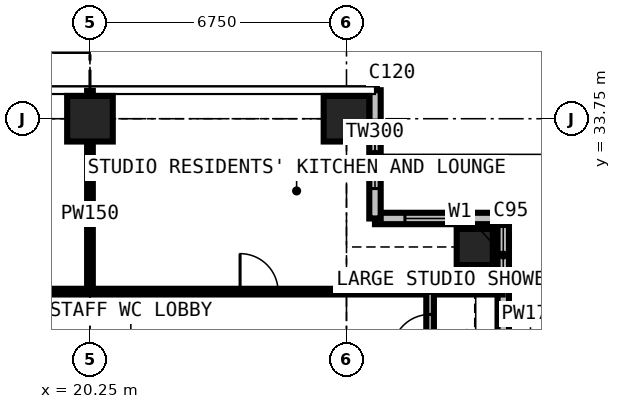
"""IFC4 building model, lengths in metres.
Left out: names, types, materials, properties, quantities, classifications, styles, units other than length and angle.
Written with IfcOpenShell. Run it as: python <this file> out.ifc"""

import sys

from ifc_helpers import new_model, si_unit, direction, frame, frame_2d, origin, origin_2d, place, context, subcontext, project, spatial, rectangle, extrude, element, fill, save


model = new_model("IFC4")
c1 = context("Model", 3, precision=1e-05, world=origin(), true_north=direction((0.0, 1.0)))
c2 = subcontext(c1, "Body", "Model", "MODEL_VIEW")
j1 = project(units=[si_unit("LENGTHUNIT", "METRE"), si_unit("PLANEANGLEUNIT", "RADIAN")], contexts=[c1])
p1 = place(None, origin())
s1 = spatial("IfcSite", under=j1, at=p1, CompositionType="ELEMENT")
p2 = place(p1, origin())
s2 = spatial("IfcBuilding", under=s1, at=p2, CompositionType="ELEMENT")
p3 = place(p2, frame((0.0, 0.0, 174.6)))
s3 = spatial("IfcBuildingStorey", under=s2, at=p3, CompositionType="ELEMENT", Elevation=174.6)
for number, where, z_axis, x_axis in (
    (1, (20.25, 33.75, 0.0), (0.0, 0.0, 1.0), (1.0, 0.0, 0.0)),
    (2, (27.0, 33.75, 0.0), (0.0, 0.0, 1.0), (1.0, 0.0, 0.0)),
):
    element("IfcColumn", number, at=place(p3, frame(where, z_axis=z_axis, x_axis=x_axis)), inside=s3, PredefinedType="COLUMN", context=c2, shape_type="SweptSolid", body=[
        extrude(rectangle(XDim=1.2, YDim=1.2, at=origin_2d()), origin(), (0.0, 0.0, 1.0), 3.6),
    ])
p4 = place(p3, frame((30.375, 30.375, 0.0), z_axis=(0.0, 0.0, 1.0), x_axis=(1.0, 0.0, 0.0)))
e3 = element("IfcColumn", 3, at=p4, inside=s3, PredefinedType="COLUMN", context=c2, shape_type="SweptSolid", body=[
    extrude(rectangle(XDim=0.95, YDim=0.95, at=origin_2d()), origin(), (0.0, 0.0, 1.0), 3.6),
])
p5 = place(p3, frame((31.125, 27.75, 0.0), z_axis=(0.0, 0.0, 1.0), x_axis=(0.0, 1.0, 0.0)))
e4 = element("IfcWall", 4, at=p5, inside=s3, PredefinedType="SOLIDWALL", context=c2, shape_type="SweptSolid", body=[
    extrude(rectangle(XDim=3.375, YDim=0.3, at=frame_2d((1.688, 0.0))), origin(), (0.0, 0.0, 1.0), 3.375),
])
p6 = place(p5, frame((1.663, 0.0, 0.9)))
e5 = element("IfcOpeningElement", 5, at=p6, cuts=e4, PredefinedType="OPENING", context=c2, shape_type="SweptSolid", body=[
    extrude(rectangle(XDim=1.5, YDim=1.8, at=frame_2d((0.75, 0.9))), frame((0.0, 0.16, 0.0), z_axis=(0.0, -1.0, 0.0), x_axis=(1.0, 0.0, 0.0)), (0.0, 0.0, 1.0), 0.32),
])
p7 = place(p3, frame((31.125, 31.125, 0.0), z_axis=(0.0, 0.0, 1.0), x_axis=(-1.0, 0.0, 0.0)))
e6 = element("IfcWall", 6, at=p7, inside=s3, PredefinedType="SOLIDWALL", context=c2, shape_type="SweptSolid", body=[
    extrude(rectangle(XDim=3.375, YDim=0.3, at=frame_2d((1.688, 0.0))), origin(), (0.0, 0.0, 1.0), 3.375),
])
p8 = place(p7, frame((0.788, 0.0, 0.6)))
e7 = element("IfcOpeningElement", 7, at=p8, cuts=e6, PredefinedType="OPENING", context=c2, shape_type="SweptSolid", body=[
    extrude(rectangle(XDim=1.8, YDim=2.1, at=frame_2d((0.9, 1.05))), frame((0.0, 0.16, 0.0), z_axis=(0.0, -1.0, 0.0), x_axis=(1.0, 0.0, 0.0)), (0.0, 0.0, 1.0), 0.32),
])
p9 = place(p3, frame((27.75, 31.125, 0.0), z_axis=(0.0, 0.0, 1.0), x_axis=(0.0, 1.0, 0.0)))
e8 = element("IfcWall", 8, at=p9, inside=s3, PredefinedType="SOLIDWALL", context=c2, shape_type="SweptSolid", body=[
    extrude(rectangle(XDim=3.375, YDim=0.3, at=frame_2d((1.688, 0.0))), origin(), (0.0, 0.0, 1.0), 3.375),
])
p10 = place(p9, frame((0.788, 0.0, 0.6)))
e9 = element("IfcOpeningElement", 9, at=p10, cuts=e8, PredefinedType="OPENING", context=c2, shape_type="SweptSolid", body=[
    extrude(rectangle(XDim=1.8, YDim=2.1, at=frame_2d((0.9, 1.05))), frame((0.0, 0.16, 0.0), z_axis=(0.0, -1.0, 0.0), x_axis=(1.0, 0.0, 0.0)), (0.0, 0.0, 1.0), 0.32),
])
p11 = place(p3, frame((11.3, 29.2, 0.0), z_axis=(0.0, 0.0, 1.0), x_axis=(1.0, 0.0, 0.0)))
e10 = element("IfcWall", 10, at=p11, inside=s3, PredefinedType="PARTITIONING", context=c2, shape_type="SweptSolid", body=[
    extrude(rectangle(XDim=19.809, YDim=0.15, at=frame_2d((9.904, 0.0))), origin(), (0.0, 0.0, 1.0), 3.375),
])
p12 = place(p11, frame((12.9, 0.0, 0.0)))
e11 = element("IfcOpeningElement", 11, at=p12, cuts=e10, PredefinedType="OPENING", context=c2, shape_type="SweptSolid", body=[
    extrude(rectangle(XDim=1.0, YDim=2.2, at=frame_2d((0.5, 1.1))), frame((0.0, 0.085, 0.0), z_axis=(0.0, -1.0, 0.0), x_axis=(1.0, 0.0, 0.0)), (0.0, 0.0, 1.0), 0.17),
])
p13 = place(p11, frame((6.4, 0.0, 0.0)))
e12 = element("IfcOpeningElement", 12, at=p13, cuts=e10, PredefinedType="OPENING", context=c2, shape_type="SweptSolid", body=[
    extrude(rectangle(XDim=0.95, YDim=2.2, at=frame_2d((0.475, 1.1))), frame((0.0, 0.085, 0.0), z_axis=(0.0, -1.0, 0.0), x_axis=(1.0, 0.0, 0.0)), (0.0, 0.0, 1.0), 0.17),
])
p14 = place(p11, frame((0.6, 0.0, 0.0)))
e13 = element("IfcOpeningElement", 13, at=p14, cuts=e10, PredefinedType="OPENING", context=c2, shape_type="SweptSolid", body=[
    extrude(rectangle(XDim=1.0, YDim=2.2, at=frame_2d((0.5, 1.1))), frame((0.0, 0.085, 0.0), z_axis=(0.0, -1.0, 0.0), x_axis=(1.0, 0.0, 0.0)), (0.0, 0.0, 1.0), 0.17),
])
p15 = place(p3, frame((20.25, 29.2, 0.0), z_axis=(0.0, 0.0, 1.0), x_axis=(0.0, 1.0, 0.0)))
e14 = element("IfcWall", 14, at=p15, inside=s3, PredefinedType="PARTITIONING", context=c2, shape_type="SweptSolid", body=[
    extrude(rectangle(XDim=5.284, YDim=0.15, at=frame_2d((2.642, 0.0))), origin(), (0.0, 0.0, 1.0), 2.61),
])
p16 = place(p3, frame((29.2, 13.5, 0.0), z_axis=(0.0, 0.0, 1.0), x_axis=(0.0, 1.0, 0.0)))
e15 = element("IfcWall", 15, at=p16, inside=s3, PredefinedType="PARTITIONING", context=c2, shape_type="SweptSolid", body=[
    extrude(rectangle(XDim=15.7, YDim=0.2, at=frame_2d((7.85, 0.0))), origin(), (0.0, 0.0, 1.0), 3.375),
])
p17 = place(p16, frame((8.35, 0.0, 0.0)))
e16 = element("IfcOpeningElement", 16, at=p17, cuts=e15, PredefinedType="OPENING", context=c2, shape_type="SweptSolid", body=[
    extrude(rectangle(XDim=0.95, YDim=2.2, at=frame_2d((0.475, 1.1))), frame((0.0, 0.11, 0.0), z_axis=(0.0, -1.0, 0.0), x_axis=(1.0, 0.0, 0.0)), (0.0, 0.0, 1.0), 0.22),
])
p18 = place(p16, frame((1.6, 0.0, 0.0)))
e17 = element("IfcOpeningElement", 17, at=p18, cuts=e15, PredefinedType="OPENING", context=c2, shape_type="SweptSolid", body=[
    extrude(rectangle(XDim=0.95, YDim=2.2, at=frame_2d((0.475, 1.1))), frame((0.0, 0.11, 0.0), z_axis=(0.0, -1.0, 0.0), x_axis=(1.0, 0.0, 0.0)), (0.0, 0.0, 1.0), 0.22),
])
p19 = place(p16, frame((14.1, 0.0, 0.0)))
e18 = element("IfcOpeningElement", 18, at=p19, cuts=e15, PredefinedType="OPENING", context=c2, shape_type="SweptSolid", body=[
    extrude(rectangle(XDim=1.0, YDim=2.2, at=frame_2d((0.5, 1.1))), frame((0.0, 0.11, 0.0), z_axis=(0.0, -1.0, 0.0), x_axis=(1.0, 0.0, 0.0)), (0.0, 0.0, 1.0), 0.22),
])
p20 = place(p6, origin())
e19 = element("IfcWindow", 19, at=p20, inside=s3, PartitioningType="SINGLE_PANEL", PredefinedType="WINDOW", context=c2, shape_type="SweptSolid", body=[
    extrude(rectangle(XDim=1.5, YDim=1.8, at=frame_2d((0.75, 0.9))), frame((0.0, 0.03, 0.0), z_axis=(0.0, -1.0, 0.0), x_axis=(1.0, 0.0, 0.0)), (0.0, 0.0, 1.0), 0.06),
])
fill(e5, e19)
p21 = place(p8, origin())
e20 = element("IfcWindow", 20, at=p21, inside=s3, PartitioningType="SINGLE_PANEL", PredefinedType="WINDOW", context=c2, shape_type="SweptSolid", body=[
    extrude(rectangle(XDim=1.8, YDim=2.1, at=frame_2d((0.9, 1.05))), frame((0.0, 0.03, 0.0), z_axis=(0.0, -1.0, 0.0), x_axis=(1.0, 0.0, 0.0)), (0.0, 0.0, 1.0), 0.06),
])
fill(e7, e20)
p22 = place(p10, origin())
e21 = element("IfcWindow", 21, at=p22, inside=s3, PartitioningType="SINGLE_PANEL", PredefinedType="WINDOW", context=c2, shape_type="SweptSolid", body=[
    extrude(rectangle(XDim=1.8, YDim=2.1, at=frame_2d((0.9, 1.05))), frame((0.0, 0.03, 0.0), z_axis=(0.0, -1.0, 0.0), x_axis=(1.0, 0.0, 0.0)), (0.0, 0.0, 1.0), 0.06),
])
fill(e9, e21)
p23 = place(p19, origin())
e22 = element("IfcDoor", 22, at=p23, inside=s3, OperationType="SINGLE_SWING_LEFT", PredefinedType="DOOR", context=c2, shape_type="SweptSolid", body=[
    extrude(rectangle(XDim=1.0, YDim=2.2, at=frame_2d((0.5, 1.1))), frame((0.0, 0.025, 0.0), z_axis=(0.0, -1.0, 0.0), x_axis=(1.0, 0.0, 0.0)), (0.0, 0.0, 1.0), 0.05),
])
fill(e18, e22)
p24 = place(p12, origin())
e23 = element("IfcDoor", 23, at=p24, inside=s3, OperationType="SINGLE_SWING_LEFT", PredefinedType="DOOR", context=c2, shape_type="SweptSolid", body=[
    extrude(rectangle(XDim=1.0, YDim=2.2, at=frame_2d((0.5, 1.1))), frame((0.0, 0.025, 0.0), z_axis=(0.0, -1.0, 0.0), x_axis=(1.0, 0.0, 0.0)), (0.0, 0.0, 1.0), 0.05),
])
fill(e11, e23)
save(model, sys.argv[1])
